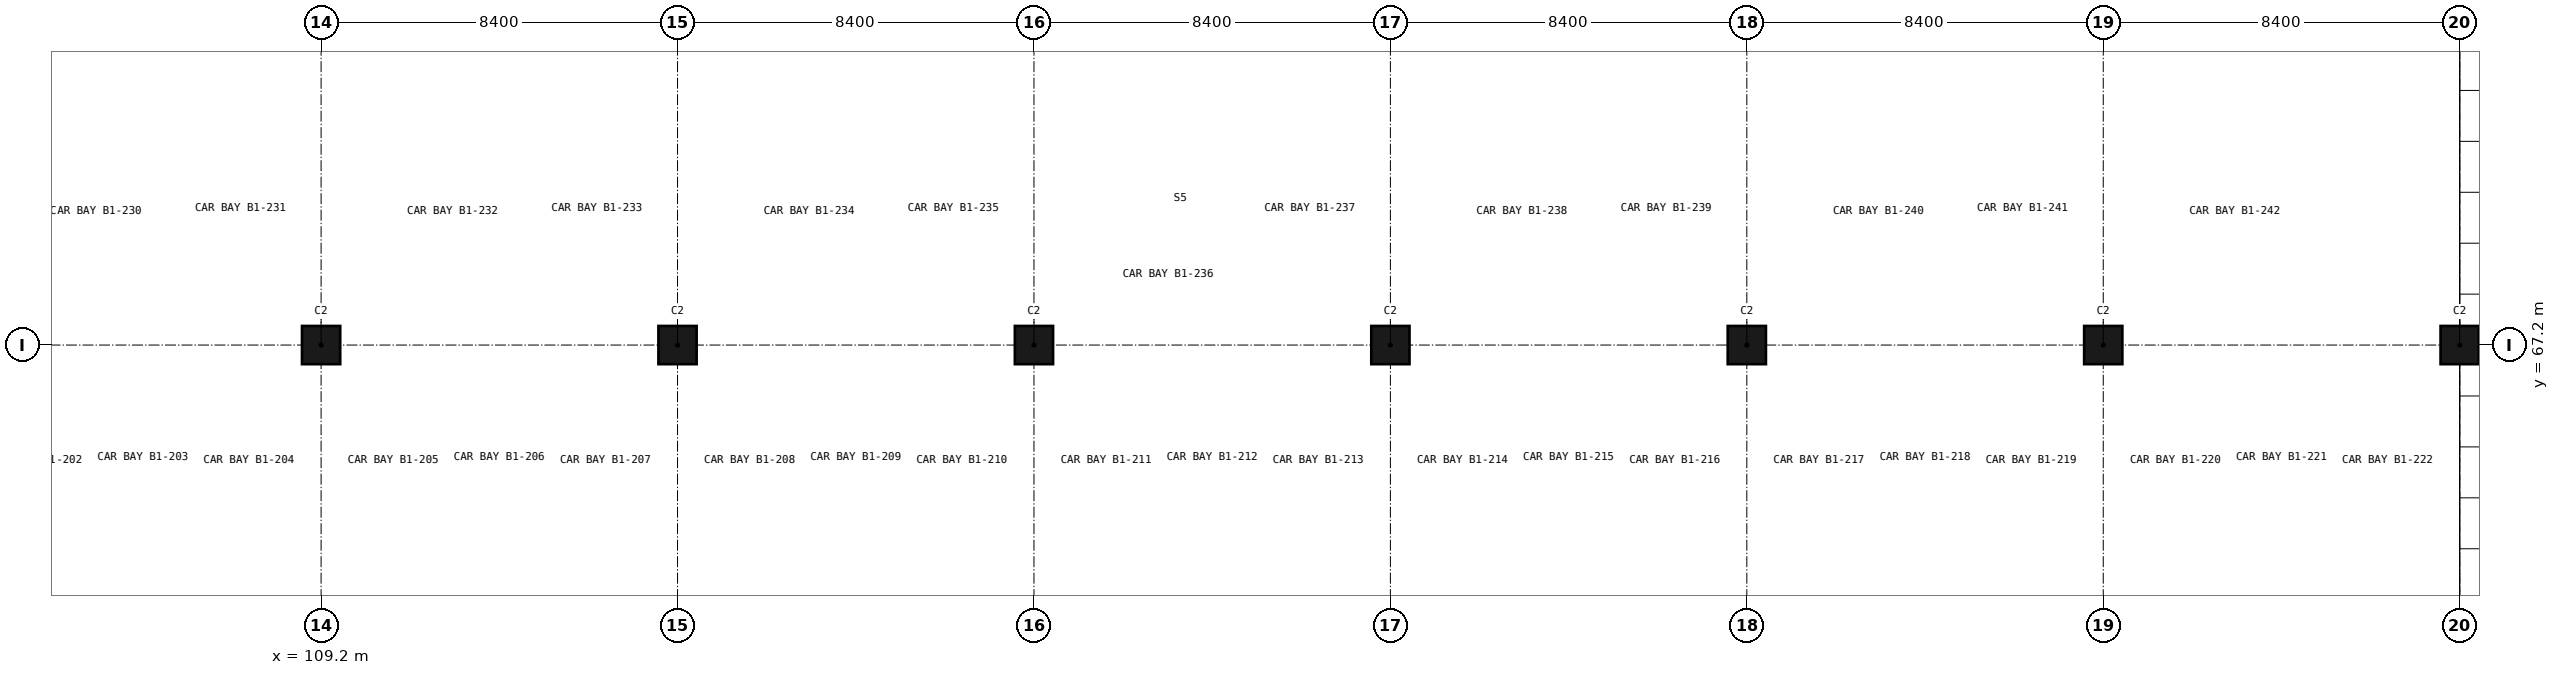
"""IFC4 building model, lengths in metres.
Left out: names, types, materials, properties, quantities, classifications, styles, units other than length and angle.
Written with IfcOpenShell. Run it as: python <this file> out.ifc"""

import sys

from ifc_helpers import new_model, si_unit, direction, frame, origin, origin_2d, place, context, subcontext, project, spatial, rectangle, extrude, element, save


model = new_model("IFC4")
c1 = context("Model", 3, precision=1e-05, world=origin(), true_north=direction((0.0, 1.0)))
c2 = subcontext(c1, "Body", "Model", "MODEL_VIEW")
j1 = project(units=[si_unit("LENGTHUNIT", "METRE"), si_unit("PLANEANGLEUNIT", "RADIAN")], contexts=[c1])
p1 = place(None, origin())
s1 = spatial("IfcSite", under=j1, at=p1, CompositionType="ELEMENT")
p2 = place(p1, origin())
s2 = spatial("IfcBuilding", under=s1, at=p2, CompositionType="ELEMENT")
p3 = place(p2, frame((0.0, 0.0, -4.8)))
s3 = spatial("IfcBuildingStorey", under=s2, at=p3, CompositionType="ELEMENT", Elevation=-4.8)
for number, where, z_axis, x_axis in (
    (1, (109.2, 67.2, -0.3), (0.0, 0.0, 1.0), (1.0, 0.0, 0.0)),
    (2, (117.6, 67.2, -0.3), (0.0, 0.0, 1.0), (1.0, 0.0, 0.0)),
    (3, (126.0, 67.2, -0.3), (0.0, 0.0, 1.0), (1.0, 0.0, 0.0)),
    (4, (134.4, 67.2, -0.3), (0.0, 0.0, 1.0), (1.0, 0.0, 0.0)),
    (5, (142.8, 67.2, -0.3), (0.0, 0.0, 1.0), (1.0, 0.0, 0.0)),
    (6, (151.2, 67.2, -0.3), (0.0, 0.0, 1.0), (1.0, 0.0, 0.0)),
    (7, (159.6, 67.2, -0.3), (0.0, 0.0, 1.0), (1.0, 0.0, 0.0)),
):
    element("IfcColumn", number, at=place(p3, frame(where, z_axis=z_axis, x_axis=x_axis)), inside=s3, PredefinedType="COLUMN", context=c2, shape_type="SweptSolid", body=[
        extrude(rectangle(XDim=0.9, YDim=0.9, at=origin_2d()), origin(), (0.0, 0.0, 1.0), 4.8),
    ])
save(model, sys.argv[1])
